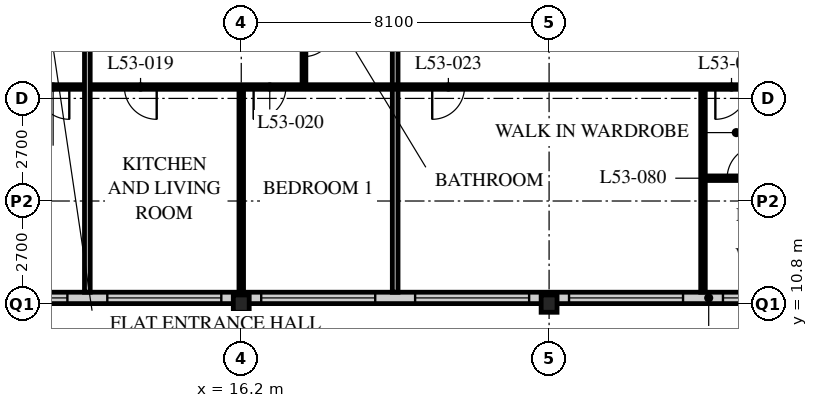
"""IFC4 building model, lengths in metres.
Left out: names, types, materials, properties, quantities, classifications, styles, units other than length and angle.
Written with IfcOpenShell. Run it as: python <this file> out.ifc"""

import sys

from ifc_helpers import new_model, si_unit, direction, frame, frame_2d, origin, origin_2d, place, context, subcontext, project, spatial, rectangle, i_section, extrude, element, fill, save


model = new_model("IFC4")
c1 = context("Model", 3, precision=1e-05, world=origin(), true_north=direction((0.0, 1.0)))
c2 = subcontext(c1, "Body", "Model", "MODEL_VIEW")
j1 = project(units=[si_unit("LENGTHUNIT", "METRE"), si_unit("PLANEANGLEUNIT", "RADIAN")], contexts=[c1])
p1 = place(None, origin())
s1 = spatial("IfcSite", under=j1, at=p1, CompositionType="ELEMENT")
p2 = place(p1, origin())
s2 = spatial("IfcBuilding", under=s1, at=p2, CompositionType="ELEMENT")
p3 = place(p2, frame((0.0, 0.0, 206.4)))
s3 = spatial("IfcBuildingStorey", under=s2, at=p3, CompositionType="ELEMENT", Elevation=206.4)
for number, where, z_axis, x_axis in (
    (1, (16.2, 10.8, 0.0), (0.0, 0.0, 1.0), (1.0, 0.0, 0.0)),
    (2, (24.3, 10.8, 0.0), (0.0, 0.0, 1.0), (1.0, 0.0, 0.0)),
):
    element("IfcColumn", number, at=place(p3, frame(where, z_axis=z_axis, x_axis=x_axis)), inside=s3, PredefinedType="COLUMN", context=c2, shape_type="SweptSolid", body=[
        extrude(i_section(OverallWidth=0.418, OverallDepth=0.456, WebThickness=0.042, FlangeThickness=0.067, FilletRadius=0.015, at=origin_2d()), origin(), (0.0, 0.0, 1.0), 3.6),
    ])
p4 = place(p3, frame((8.4, 10.95, 0.0), z_axis=(0.0, 0.0, 1.0), x_axis=(1.0, 0.0, 0.0)))
e3 = element("IfcWall", 3, at=p4, inside=s3, PredefinedType="SOLIDWALL", context=c2, shape_type="SweptSolid", body=[
    extrude(rectangle(XDim=40.2, YDim=0.3, at=frame_2d((20.1, 0.0))), origin(), (0.0, 0.0, 1.0), 3.39),
])
p5 = place(p4, frame((0.225, 0.0, 0.6)))
e4 = element("IfcOpeningElement", 4, at=p5, cuts=e3, PredefinedType="OPENING", context=c2, shape_type="SweptSolid", body=[
    extrude(rectangle(XDim=3.0, YDim=2.4, at=frame_2d((1.5, 1.2))), frame((0.0, 0.16, 0.0), z_axis=(0.0, -1.0, 0.0), x_axis=(1.0, 0.0, 0.0)), (0.0, 0.0, 1.0), 0.32),
])
p6 = place(p4, frame((4.275, 0.0, 0.6)))
e5 = element("IfcOpeningElement", 5, at=p6, cuts=e3, PredefinedType="OPENING", context=c2, shape_type="SweptSolid", body=[
    extrude(rectangle(XDim=3.0, YDim=2.4, at=frame_2d((1.5, 1.2))), frame((0.0, 0.16, 0.0), z_axis=(0.0, -1.0, 0.0), x_axis=(1.0, 0.0, 0.0)), (0.0, 0.0, 1.0), 0.32),
])
p7 = place(p4, frame((8.325, 0.0, 0.6)))
e6 = element("IfcOpeningElement", 6, at=p7, cuts=e3, PredefinedType="OPENING", context=c2, shape_type="SweptSolid", body=[
    extrude(rectangle(XDim=3.0, YDim=2.4, at=frame_2d((1.5, 1.2))), frame((0.0, 0.16, 0.0), z_axis=(0.0, -1.0, 0.0), x_axis=(1.0, 0.0, 0.0)), (0.0, 0.0, 1.0), 0.32),
])
p8 = place(p4, frame((12.375, 0.0, 0.6)))
e7 = element("IfcOpeningElement", 7, at=p8, cuts=e3, PredefinedType="OPENING", context=c2, shape_type="SweptSolid", body=[
    extrude(rectangle(XDim=3.0, YDim=2.4, at=frame_2d((1.5, 1.2))), frame((0.0, 0.16, 0.0), z_axis=(0.0, -1.0, 0.0), x_axis=(1.0, 0.0, 0.0)), (0.0, 0.0, 1.0), 0.32),
])
p9 = place(p4, frame((16.425, 0.0, 0.6)))
e8 = element("IfcOpeningElement", 8, at=p9, cuts=e3, PredefinedType="OPENING", context=c2, shape_type="SweptSolid", body=[
    extrude(rectangle(XDim=3.0, YDim=2.4, at=frame_2d((1.5, 1.2))), frame((0.0, 0.16, 0.0), z_axis=(0.0, -1.0, 0.0), x_axis=(1.0, 0.0, 0.0)), (0.0, 0.0, 1.0), 0.32),
])
p10 = place(p4, frame((20.475, 0.0, 0.6)))
e9 = element("IfcOpeningElement", 9, at=p10, cuts=e3, PredefinedType="OPENING", context=c2, shape_type="SweptSolid", body=[
    extrude(rectangle(XDim=3.0, YDim=2.4, at=frame_2d((1.5, 1.2))), frame((0.0, 0.16, 0.0), z_axis=(0.0, -1.0, 0.0), x_axis=(1.0, 0.0, 0.0)), (0.0, 0.0, 1.0), 0.32),
])
p11 = place(p4, frame((24.525, 0.0, 0.6)))
e10 = element("IfcOpeningElement", 10, at=p11, cuts=e3, PredefinedType="OPENING", context=c2, shape_type="SweptSolid", body=[
    extrude(rectangle(XDim=3.0, YDim=2.4, at=frame_2d((1.5, 1.2))), frame((0.0, 0.16, 0.0), z_axis=(0.0, -1.0, 0.0), x_axis=(1.0, 0.0, 0.0)), (0.0, 0.0, 1.0), 0.32),
])
p12 = place(p4, frame((28.575, 0.0, 0.6)))
e11 = element("IfcOpeningElement", 11, at=p12, cuts=e3, PredefinedType="OPENING", context=c2, shape_type="SweptSolid", body=[
    extrude(rectangle(XDim=3.0, YDim=2.4, at=frame_2d((1.5, 1.2))), frame((0.0, 0.16, 0.0), z_axis=(0.0, -1.0, 0.0), x_axis=(1.0, 0.0, 0.0)), (0.0, 0.0, 1.0), 0.32),
])
p13 = place(p4, frame((32.625, 0.0, 0.6)))
e12 = element("IfcOpeningElement", 12, at=p13, cuts=e3, PredefinedType="OPENING", context=c2, shape_type="SweptSolid", body=[
    extrude(rectangle(XDim=3.0, YDim=2.4, at=frame_2d((1.5, 1.2))), frame((0.0, 0.16, 0.0), z_axis=(0.0, -1.0, 0.0), x_axis=(1.0, 0.0, 0.0)), (0.0, 0.0, 1.0), 0.32),
])
p14 = place(p4, frame((36.675, 0.0, 0.6)))
e13 = element("IfcOpeningElement", 13, at=p14, cuts=e3, PredefinedType="OPENING", context=c2, shape_type="SweptSolid", body=[
    extrude(rectangle(XDim=3.0, YDim=2.4, at=frame_2d((1.5, 1.2))), frame((0.0, 0.16, 0.0), z_axis=(0.0, -1.0, 0.0), x_axis=(1.0, 0.0, 0.0)), (0.0, 0.0, 1.0), 0.32),
])
p15 = place(p3, frame((17.85, 18.9, 0.0), z_axis=(0.0, 0.0, 1.0), x_axis=(0.0, -1.0, 0.0)))
e14 = element("IfcWall", 14, at=p15, inside=s3, PredefinedType="PARTITIONING", context=c2, shape_type="SweptSolid", body=[
    extrude(rectangle(XDim=2.4, YDim=0.1, at=frame_2d((1.2, 0.0))), origin(), (0.0, 0.0, 1.0), 3.39),
])
p16 = place(p15, frame((0.8, 0.0, 0.0)))
e15 = element("IfcOpeningElement", 15, at=p16, cuts=e14, PredefinedType="OPENING", context=c2, shape_type="SweptSolid", body=[
    extrude(rectangle(XDim=0.8, YDim=2.1, at=frame_2d((0.4, 1.05))), frame((0.0, 0.06, 0.0), z_axis=(0.0, -1.0, 0.0), x_axis=(1.0, 0.0, 0.0)), (0.0, 0.0, 1.0), 0.12),
])
p17 = place(p3, frame((16.2, 16.5, 0.0), z_axis=(0.0, 0.0, 1.0), x_axis=(0.0, -1.0, 0.0)))
e16 = element("IfcWall", 16, at=p17, inside=s3, PredefinedType="PARTITIONING", context=c2, shape_type="SweptSolid", body=[
    extrude(rectangle(XDim=5.4, YDim=0.12, at=frame_2d((2.7, 0.0))), origin(), (0.0, 0.0, 1.0), 2.778),
])
p18 = place(p3, frame((20.25, 18.9, 0.0), z_axis=(0.0, 0.0, 1.0), x_axis=(0.0, -1.0, 0.0)))
e17 = element("IfcWall", 17, at=p18, inside=s3, PredefinedType="PARTITIONING", context=c2, shape_type="SweptSolid", body=[
    extrude(rectangle(XDim=7.8, YDim=0.15, at=frame_2d((3.9, 0.0))), origin(), (0.0, 0.0, 1.0), 3.39),
])
p19 = place(p3, frame((28.35, 16.5, 0.0), z_axis=(0.0, 0.0, 1.0), x_axis=(0.0, -1.0, 0.0)))
e18 = element("IfcWall", 18, at=p19, inside=s3, PredefinedType="PARTITIONING", context=c2, shape_type="SweptSolid", body=[
    extrude(rectangle(XDim=5.4, YDim=0.12, at=frame_2d((2.7, 0.0))), origin(), (0.0, 0.0, 1.0), 3.39),
])
p20 = place(p3, frame((8.1, 16.5, 0.0), z_axis=(0.0, 0.0, 1.0), x_axis=(1.0, 0.0, 0.0)))
e19 = element("IfcWall", 19, at=p20, inside=s3, PredefinedType="PARTITIONING", context=c2, shape_type="SweptSolid", body=[
    extrude(rectangle(XDim=28.35, YDim=0.12, at=frame_2d((14.175, 0.0))), origin(), (0.0, 0.0, 1.0), 3.39),
])
p21 = place(p20, frame((5.025, 0.0, 0.0)))
e20 = element("IfcOpeningElement", 20, at=p21, cuts=e19, PredefinedType="OPENING", context=c2, shape_type="SweptSolid", body=[
    extrude(rectangle(XDim=0.85, YDim=2.1, at=frame_2d((0.425, 1.05))), frame((0.0, 0.07, 0.0), z_axis=(0.0, -1.0, 0.0), x_axis=(1.0, 0.0, 0.0)), (0.0, 0.0, 1.0), 0.14),
])
p22 = place(p20, frame((8.425, 0.0, 0.0)))
e21 = element("IfcOpeningElement", 21, at=p22, cuts=e19, PredefinedType="OPENING", context=c2, shape_type="SweptSolid", body=[
    extrude(rectangle(XDim=0.85, YDim=2.1, at=frame_2d((0.425, 1.05))), frame((0.0, 0.07, 0.0), z_axis=(0.0, -1.0, 0.0), x_axis=(1.0, 0.0, 0.0)), (0.0, 0.0, 1.0), 0.14),
])
p23 = place(p20, frame((13.125, 0.0, 0.0)))
e22 = element("IfcOpeningElement", 22, at=p23, cuts=e19, PredefinedType="OPENING", context=c2, shape_type="SweptSolid", body=[
    extrude(rectangle(XDim=0.85, YDim=2.1, at=frame_2d((0.425, 1.05))), frame((0.0, 0.07, 0.0), z_axis=(0.0, -1.0, 0.0), x_axis=(1.0, 0.0, 0.0)), (0.0, 0.0, 1.0), 0.14),
])
p24 = place(p20, frame((20.575, 0.0, 0.0)))
e23 = element("IfcOpeningElement", 23, at=p24, cuts=e19, PredefinedType="OPENING", context=c2, shape_type="SweptSolid", body=[
    extrude(rectangle(XDim=0.85, YDim=2.1, at=frame_2d((0.425, 1.05))), frame((0.0, 0.07, 0.0), z_axis=(0.0, -1.0, 0.0), x_axis=(1.0, 0.0, 0.0)), (0.0, 0.0, 1.0), 0.14),
])
p25 = place(p20, frame((24.625, 0.0, 0.0)))
e24 = element("IfcOpeningElement", 24, at=p25, cuts=e19, PredefinedType="OPENING", context=c2, shape_type="SweptSolid", body=[
    extrude(rectangle(XDim=0.85, YDim=2.1, at=frame_2d((0.425, 1.05))), frame((0.0, 0.07, 0.0), z_axis=(0.0, -1.0, 0.0), x_axis=(1.0, 0.0, 0.0)), (0.0, 0.0, 1.0), 0.14),
])
p26 = place(p20, frame((2.725, 0.0, 0.0)))
e25 = element("IfcOpeningElement", 25, at=p26, cuts=e19, PredefinedType="OPENING", context=c2, shape_type="SweptSolid", body=[
    extrude(rectangle(XDim=0.85, YDim=2.1, at=frame_2d((0.425, 1.05))), frame((0.0, 0.07, 0.0), z_axis=(0.0, -1.0, 0.0), x_axis=(1.0, 0.0, 0.0)), (0.0, 0.0, 1.0), 0.14),
])
p27 = place(p3, frame((12.15, 18.9, 0.0), z_axis=(0.0, 0.0, 1.0), x_axis=(0.0, -1.0, 0.0)))
e26 = element("IfcWall", 26, at=p27, inside=s3, PredefinedType="PARTITIONING", context=c2, shape_type="SweptSolid", body=[
    extrude(rectangle(XDim=7.8, YDim=0.15, at=frame_2d((3.9, 0.0))), origin(), (0.0, 0.0, 1.0), 3.39),
])
p28 = place(p3, frame((30.11, 14.1, 0.0), z_axis=(0.0, 0.0, 1.0), x_axis=(-1.0, 0.0, 0.0)))
e27 = element("IfcWall", 27, at=p28, inside=s3, PredefinedType="PARTITIONING", context=c2, shape_type="SweptSolid", body=[
    extrude(rectangle(XDim=1.76, YDim=0.12, at=frame_2d((0.88, 0.0))), origin(), (0.0, 0.0, 1.0), 3.39),
])
p29 = place(p28, frame((0.275, 0.0, 0.0)))
e28 = element("IfcOpeningElement", 28, at=p29, cuts=e27, PredefinedType="OPENING", context=c2, shape_type="SweptSolid", body=[
    extrude(rectangle(XDim=0.85, YDim=2.1, at=frame_2d((0.425, 1.05))), frame((0.0, 0.07, 0.0), z_axis=(0.0, -1.0, 0.0), x_axis=(1.0, 0.0, 0.0)), (0.0, 0.0, 1.0), 0.14),
])
p30 = place(p5, origin())
e29 = element("IfcWindow", 29, at=p30, inside=s3, PartitioningType="SINGLE_PANEL", PredefinedType="WINDOW", context=c2, shape_type="SweptSolid", body=[
    extrude(rectangle(XDim=3.0, YDim=2.4, at=frame_2d((1.5, 1.2))), frame((0.0, 0.03, 0.0), z_axis=(0.0, -1.0, 0.0), x_axis=(1.0, 0.0, 0.0)), (0.0, 0.0, 1.0), 0.06),
])
fill(e4, e29)
p31 = place(p6, origin())
e30 = element("IfcWindow", 30, at=p31, inside=s3, PartitioningType="SINGLE_PANEL", PredefinedType="WINDOW", context=c2, shape_type="SweptSolid", body=[
    extrude(rectangle(XDim=3.0, YDim=2.4, at=frame_2d((1.5, 1.2))), frame((0.0, 0.03, 0.0), z_axis=(0.0, -1.0, 0.0), x_axis=(1.0, 0.0, 0.0)), (0.0, 0.0, 1.0), 0.06),
])
fill(e5, e30)
p32 = place(p7, origin())
e31 = element("IfcWindow", 31, at=p32, inside=s3, PartitioningType="SINGLE_PANEL", PredefinedType="WINDOW", context=c2, shape_type="SweptSolid", body=[
    extrude(rectangle(XDim=3.0, YDim=2.4, at=frame_2d((1.5, 1.2))), frame((0.0, 0.03, 0.0), z_axis=(0.0, -1.0, 0.0), x_axis=(1.0, 0.0, 0.0)), (0.0, 0.0, 1.0), 0.06),
])
fill(e6, e31)
p33 = place(p8, origin())
e32 = element("IfcWindow", 32, at=p33, inside=s3, PartitioningType="SINGLE_PANEL", PredefinedType="WINDOW", context=c2, shape_type="SweptSolid", body=[
    extrude(rectangle(XDim=3.0, YDim=2.4, at=frame_2d((1.5, 1.2))), frame((0.0, 0.03, 0.0), z_axis=(0.0, -1.0, 0.0), x_axis=(1.0, 0.0, 0.0)), (0.0, 0.0, 1.0), 0.06),
])
fill(e7, e32)
p34 = place(p9, origin())
e33 = element("IfcWindow", 33, at=p34, inside=s3, PartitioningType="SINGLE_PANEL", PredefinedType="WINDOW", context=c2, shape_type="SweptSolid", body=[
    extrude(rectangle(XDim=3.0, YDim=2.4, at=frame_2d((1.5, 1.2))), frame((0.0, 0.03, 0.0), z_axis=(0.0, -1.0, 0.0), x_axis=(1.0, 0.0, 0.0)), (0.0, 0.0, 1.0), 0.06),
])
fill(e8, e33)
p35 = place(p10, origin())
e34 = element("IfcWindow", 34, at=p35, inside=s3, PartitioningType="SINGLE_PANEL", PredefinedType="WINDOW", context=c2, shape_type="SweptSolid", body=[
    extrude(rectangle(XDim=3.0, YDim=2.4, at=frame_2d((1.5, 1.2))), frame((0.0, 0.03, 0.0), z_axis=(0.0, -1.0, 0.0), x_axis=(1.0, 0.0, 0.0)), (0.0, 0.0, 1.0), 0.06),
])
fill(e9, e34)
p36 = place(p16, origin())
e35 = element("IfcDoor", 35, at=p36, inside=s3, OperationType="SINGLE_SWING_LEFT", PredefinedType="DOOR", context=c2, shape_type="SweptSolid", body=[
    extrude(rectangle(XDim=0.8, YDim=2.1, at=frame_2d((0.4, 1.05))), frame((0.0, 0.025, 0.0), z_axis=(0.0, -1.0, 0.0), x_axis=(1.0, 0.0, 0.0)), (0.0, 0.0, 1.0), 0.05),
])
fill(e15, e35)
p37 = place(p21, origin())
e36 = element("IfcDoor", 36, at=p37, inside=s3, OperationType="SINGLE_SWING_LEFT", PredefinedType="DOOR", context=c2, shape_type="SweptSolid", body=[
    extrude(rectangle(XDim=0.85, YDim=2.1, at=frame_2d((0.425, 1.05))), frame((0.0, 0.025, 0.0), z_axis=(0.0, -1.0, 0.0), x_axis=(1.0, 0.0, 0.0)), (0.0, 0.0, 1.0), 0.05),
])
fill(e20, e36)
p38 = place(p22, origin())
e37 = element("IfcDoor", 37, at=p38, inside=s3, OperationType="SINGLE_SWING_RIGHT", PredefinedType="DOOR", context=c2, shape_type="SweptSolid", body=[
    extrude(rectangle(XDim=0.85, YDim=2.1, at=frame_2d((0.425, 1.05))), frame((0.0, 0.025, 0.0), z_axis=(0.0, -1.0, 0.0), x_axis=(1.0, 0.0, 0.0)), (0.0, 0.0, 1.0), 0.05),
])
fill(e21, e37)
p39 = place(p23, origin())
e38 = element("IfcDoor", 38, at=p39, inside=s3, OperationType="SINGLE_SWING_RIGHT", PredefinedType="DOOR", context=c2, shape_type="SweptSolid", body=[
    extrude(rectangle(XDim=0.85, YDim=2.1, at=frame_2d((0.425, 1.05))), frame((0.0, 0.025, 0.0), z_axis=(0.0, -1.0, 0.0), x_axis=(1.0, 0.0, 0.0)), (0.0, 0.0, 1.0), 0.05),
])
fill(e22, e38)
p40 = place(p24, origin())
e39 = element("IfcDoor", 39, at=p40, inside=s3, OperationType="SINGLE_SWING_RIGHT", PredefinedType="DOOR", context=c2, shape_type="SweptSolid", body=[
    extrude(rectangle(XDim=0.85, YDim=2.1, at=frame_2d((0.425, 1.05))), frame((0.0, 0.025, 0.0), z_axis=(0.0, -1.0, 0.0), x_axis=(1.0, 0.0, 0.0)), (0.0, 0.0, 1.0), 0.05),
])
fill(e23, e39)
p41 = place(p26, origin())
e40 = element("IfcDoor", 40, at=p41, inside=s3, OperationType="SINGLE_SWING_LEFT", PredefinedType="DOOR", context=c2, shape_type="SweptSolid", body=[
    extrude(rectangle(XDim=0.85, YDim=2.1, at=frame_2d((0.425, 1.05))), frame((0.0, 0.025, 0.0), z_axis=(0.0, -1.0, 0.0), x_axis=(1.0, 0.0, 0.0)), (0.0, 0.0, 1.0), 0.05),
])
fill(e25, e40)
p42 = place(p29, origin())
e41 = element("IfcDoor", 41, at=p42, inside=s3, OperationType="SINGLE_SWING_RIGHT", PredefinedType="DOOR", context=c2, shape_type="SweptSolid", body=[
    extrude(rectangle(XDim=0.85, YDim=2.1, at=frame_2d((0.425, 1.05))), frame((0.0, 0.025, 0.0), z_axis=(0.0, -1.0, 0.0), x_axis=(1.0, 0.0, 0.0)), (0.0, 0.0, 1.0), 0.05),
])
fill(e28, e41)
save(model, sys.argv[1])
